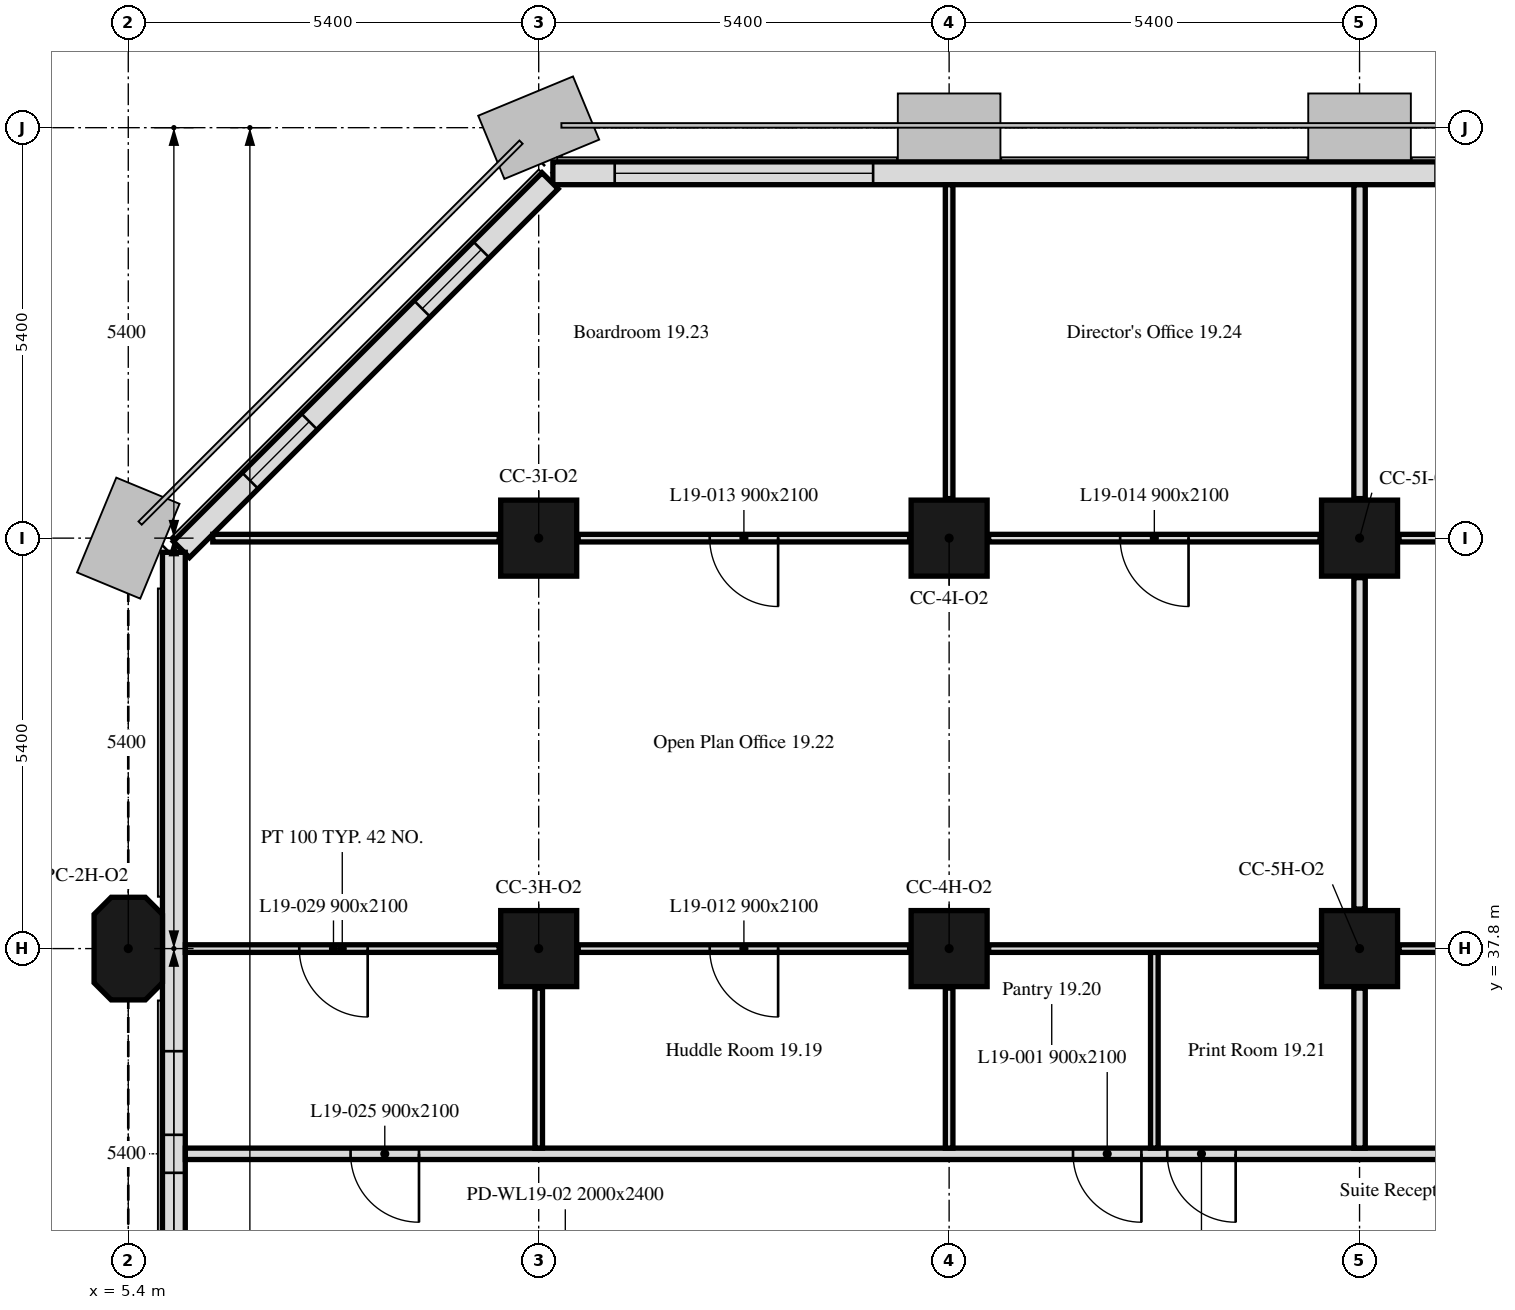
"""IFC4 building model, lengths in metres.
Left out: names, types, materials, properties, quantities, classifications, styles, units other than length and angle.
Written with IfcOpenShell. Run it as: python <this file> out.ifc"""

import sys

from ifc_helpers import new_model, si_unit, direction, frame, frame_2d, origin, origin_2d, place, context, subcontext, project, spatial, polyline, rectangle, outline, extrude, element, fill, save


model = new_model("IFC4")
c1 = context("Model", 3, precision=1e-05, world=origin(), true_north=direction((0.0, 1.0)))
c2 = subcontext(c1, "Body", "Model", "MODEL_VIEW")
j1 = project(units=[si_unit("LENGTHUNIT", "METRE"), si_unit("PLANEANGLEUNIT", "RADIAN")], contexts=[c1])
p1 = place(None, origin())
s1 = spatial("IfcSite", under=j1, at=p1, CompositionType="ELEMENT")
p2 = place(p1, origin())
s2 = spatial("IfcBuilding", under=s1, at=p2, CompositionType="ELEMENT")
p3 = place(p2, frame((0.0, 0.0, 84.0)))
s3 = spatial("IfcBuildingStorey", under=s2, at=p3, CompositionType="ELEMENT", Elevation=84.0)
p4 = place(p3, frame((5.4, 37.8, 0.0), z_axis=(0.0, 0.0, 1.0), x_axis=(0.0, 1.0, 0.0)))
e1 = element("IfcColumn", 1, at=p4, inside=s3, PredefinedType="COLUMN", context=c2, shape_type="SweptSolid", body=[
    extrude(outline(polyline([(-0.45, -0.45), (0.45, -0.45), (0.675, -0.225), (0.675, 0.225), (0.45, 0.45), (-0.45, 0.45), (-0.675, 0.225), (-0.675, -0.225), (-0.45, -0.45)])), origin(), (0.0, 0.0, 1.0), 3.5),
])
for number, where, z_axis, x_axis in (
    (2, (10.8, 37.8, 0.0), (0.0, 0.0, 1.0), (1.0, 0.0, 0.0)),
    (3, (16.2, 37.8, 0.0), (0.0, 0.0, 1.0), (1.0, 0.0, 0.0)),
    (4, (21.6, 37.8, 0.0), (0.0, 0.0, 1.0), (1.0, 0.0, 0.0)),
    (5, (10.8, 43.2, 0.0), (0.0, 0.0, 1.0), (1.0, 0.0, 0.0)),
    (6, (16.2, 43.2, 0.0), (0.0, 0.0, 1.0), (1.0, 0.0, 0.0)),
    (7, (21.6, 43.2, 0.0), (0.0, 0.0, 1.0), (1.0, 0.0, 0.0)),
):
    element("IfcColumn", number, at=place(p3, frame(where, z_axis=z_axis, x_axis=x_axis)), inside=s3, PredefinedType="COLUMN", context=c2, shape_type="SweptSolid", body=[
        extrude(rectangle(XDim=1.0, YDim=1.0, at=origin_2d()), origin(), (0.0, 0.0, 1.0), 3.5),
    ])
p5 = place(p3, frame((43.014, 48.0, 0.0), z_axis=(0.0, 0.0, 1.0), x_axis=(-1.0, 0.0, 0.0)))
e8 = element("IfcWall", 8, at=p5, inside=s3, PredefinedType="SOLIDWALL", context=c2, shape_type="SweptSolid", body=[
    extrude(rectangle(XDim=32.027, YDim=0.3, at=frame_2d((16.014, 0.0))), origin(), (0.0, 0.0, 1.0), 3.5),
])
p6 = place(p5, frame((6.214, 0.0, 0.9)))
e9 = element("IfcOpeningElement", 9, at=p6, cuts=e8, PredefinedType="OPENING", context=c2, shape_type="SweptSolid", body=[
    extrude(rectangle(XDim=3.4, YDim=1.7, at=frame_2d((1.7, 0.85))), frame((0.0, 0.16, 0.0), z_axis=(0.0, -1.0, 0.0), x_axis=(1.0, 0.0, 0.0)), (0.0, 0.0, 1.0), 0.32),
])
p7 = place(p5, frame((17.014, 0.0, 0.9)))
e10 = element("IfcOpeningElement", 10, at=p7, cuts=e8, PredefinedType="OPENING", context=c2, shape_type="SweptSolid", body=[
    extrude(rectangle(XDim=3.4, YDim=1.7, at=frame_2d((1.7, 0.85))), frame((0.0, 0.16, 0.0), z_axis=(0.0, -1.0, 0.0), x_axis=(1.0, 0.0, 0.0)), (0.0, 0.0, 1.0), 0.32),
])
p8 = place(p5, frame((27.814, 0.0, 0.9)))
e11 = element("IfcOpeningElement", 11, at=p8, cuts=e8, PredefinedType="OPENING", context=c2, shape_type="SweptSolid", body=[
    extrude(rectangle(XDim=3.4, YDim=1.7, at=frame_2d((1.7, 0.85))), frame((0.0, 0.16, 0.0), z_axis=(0.0, -1.0, 0.0), x_axis=(1.0, 0.0, 0.0)), (0.0, 0.0, 1.0), 0.32),
])
p9 = place(p3, frame((10.949, 47.901, 0.0), z_axis=(0.0, 0.0, 1.0), x_axis=(-0.707106781187, -0.707106781187, 0.0)))
e12 = element("IfcWall", 12, at=p9, inside=s3, PredefinedType="SOLIDWALL", context=c2, shape_type="SweptSolid", body=[
    extrude(rectangle(XDim=6.86, YDim=0.3, at=frame_2d((3.43, 0.0))), origin(), (0.0, 0.0, 1.0), 3.5),
])
p10 = place(p9, frame((1.28, 0.0, 0.9)))
e13 = element("IfcOpeningElement", 13, at=p10, cuts=e12, PredefinedType="OPENING", context=c2, shape_type="SweptSolid", body=[
    extrude(rectangle(XDim=1.1, YDim=1.7, at=frame_2d((0.55, 0.85))), frame((0.0, 0.16, 0.0), z_axis=(0.0, -1.0, 0.0), x_axis=(1.0, 0.0, 0.0)), (0.0, 0.0, 1.0), 0.32),
])
p11 = place(p9, frame((4.48, 0.0, 0.9)))
e14 = element("IfcOpeningElement", 14, at=p11, cuts=e12, PredefinedType="OPENING", context=c2, shape_type="SweptSolid", body=[
    extrude(rectangle(XDim=1.1, YDim=1.7, at=frame_2d((0.55, 0.85))), frame((0.0, 0.16, 0.0), z_axis=(0.0, -1.0, 0.0), x_axis=(1.0, 0.0, 0.0)), (0.0, 0.0, 1.0), 0.32),
])
p12 = place(p3, frame((6.0, 43.014, 0.0), z_axis=(0.0, 0.0, 1.0), x_axis=(0.0, -1.0, 0.0)))
e15 = element("IfcWall", 15, at=p12, inside=s3, PredefinedType="SOLIDWALL", context=c2, shape_type="SweptSolid", body=[
    extrude(rectangle(XDim=10.614, YDim=0.3, at=frame_2d((5.307, 0.0))), origin(), (0.0, 0.0, 1.0), 3.5),
])
p13 = place(p12, frame((6.564, 0.0, 0.9)))
e16 = element("IfcOpeningElement", 16, at=p13, cuts=e15, PredefinedType="OPENING", context=c2, shape_type="SweptSolid", body=[
    extrude(rectangle(XDim=1.1, YDim=1.7, at=frame_2d((0.55, 0.85))), frame((0.0, 0.16, 0.0), z_axis=(0.0, -1.0, 0.0), x_axis=(1.0, 0.0, 0.0)), (0.0, 0.0, 1.0), 0.32),
])
p14 = place(p12, frame((8.164, 0.0, 0.9)))
e17 = element("IfcOpeningElement", 17, at=p14, cuts=e15, PredefinedType="OPENING", context=c2, shape_type="SweptSolid", body=[
    extrude(rectangle(XDim=1.1, YDim=1.7, at=frame_2d((0.55, 0.85))), frame((0.0, 0.16, 0.0), z_axis=(0.0, -1.0, 0.0), x_axis=(1.0, 0.0, 0.0)), (0.0, 0.0, 1.0), 0.32),
])
p15 = place(p3, frame((47.849, 35.1, 0.0), z_axis=(0.0, 0.0, 1.0), x_axis=(-1.0, 0.0, 0.0)))
e18 = element("IfcWall", 18, at=p15, inside=s3, PredefinedType="PARTITIONING", context=c2, shape_type="SweptSolid", body=[
    extrude(rectangle(XDim=41.698, YDim=0.15, at=frame_2d((20.849, 0.0))), origin(), (0.0, 0.0, 1.0), 2.75),
])
p16 = place(p15, frame((29.119, 0.0, 0.0)))
e19 = element("IfcOpeningElement", 19, at=p16, cuts=e18, PredefinedType="OPENING", context=c2, shape_type="SweptSolid", body=[
    extrude(rectangle(XDim=0.9, YDim=2.1, at=frame_2d((0.45, 1.05))), frame((0.0, 0.075, 0.0), z_axis=(0.0, -1.0, 0.0), x_axis=(1.0, 0.0, 0.0)), (0.0, 0.0, 1.0), 0.15),
])
p17 = place(p15, frame((27.879, 0.0, 0.0)))
e20 = element("IfcOpeningElement", 20, at=p17, cuts=e18, PredefinedType="OPENING", context=c2, shape_type="SweptSolid", body=[
    extrude(rectangle(XDim=0.9, YDim=2.1, at=frame_2d((0.45, 1.05))), frame((0.0, 0.075, 0.0), z_axis=(0.0, -1.0, 0.0), x_axis=(1.0, 0.0, 0.0)), (0.0, 0.0, 1.0), 0.15),
])
p18 = place(p15, frame((18.319, 0.0, 0.0)))
e21 = element("IfcOpeningElement", 21, at=p18, cuts=e18, PredefinedType="OPENING", context=c2, shape_type="SweptSolid", body=[
    extrude(rectangle(XDim=0.9, YDim=2.1, at=frame_2d((0.45, 1.05))), frame((0.0, 0.075, 0.0), z_axis=(0.0, -1.0, 0.0), x_axis=(1.0, 0.0, 0.0)), (0.0, 0.0, 1.0), 0.15),
])
p19 = place(p15, frame((11.679, 0.0, 0.0)))
e22 = element("IfcOpeningElement", 22, at=p19, cuts=e18, PredefinedType="OPENING", context=c2, shape_type="SweptSolid", body=[
    extrude(rectangle(XDim=0.9, YDim=2.1, at=frame_2d((0.45, 1.05))), frame((0.0, 0.075, 0.0), z_axis=(0.0, -1.0, 0.0), x_axis=(1.0, 0.0, 0.0)), (0.0, 0.0, 1.0), 0.15),
])
p20 = place(p15, frame((38.624, 0.0, 0.0)))
e23 = element("IfcOpeningElement", 23, at=p20, cuts=e18, PredefinedType="OPENING", context=c2, shape_type="SweptSolid", body=[
    extrude(rectangle(XDim=0.9, YDim=2.1, at=frame_2d((0.45, 1.05))), frame((0.0, 0.075, 0.0), z_axis=(0.0, -1.0, 0.0), x_axis=(1.0, 0.0, 0.0)), (0.0, 0.0, 1.0), 0.15),
])
p21 = place(p15, frame((23.099, 0.0, 0.0)))
e24 = element("IfcOpeningElement", 24, at=p21, cuts=e18, PredefinedType="OPENING", context=c2, shape_type="SweptSolid", body=[
    extrude(rectangle(XDim=0.9, YDim=2.1, at=frame_2d((0.45, 1.05))), frame((0.0, 0.075, 0.0), z_axis=(0.0, -1.0, 0.0), x_axis=(1.0, 0.0, 0.0)), (0.0, 0.0, 1.0), 0.15),
])
p22 = place(p15, frame((6.899, 0.0, 0.0)))
e25 = element("IfcOpeningElement", 25, at=p22, cuts=e18, PredefinedType="OPENING", context=c2, shape_type="SweptSolid", body=[
    extrude(rectangle(XDim=0.9, YDim=2.1, at=frame_2d((0.45, 1.05))), frame((0.0, 0.075, 0.0), z_axis=(0.0, -1.0, 0.0), x_axis=(1.0, 0.0, 0.0)), (0.0, 0.0, 1.0), 0.15),
])
p23 = place(p3, frame((10.28, 37.8, 0.0), z_axis=(0.0, 0.0, 1.0), x_axis=(-1.0, 0.0, 0.0)))
e26 = element("IfcWall", 26, at=p23, inside=s3, PredefinedType="PARTITIONING", context=c2, shape_type="SweptSolid", body=[
    extrude(rectangle(XDim=4.129, YDim=0.1, at=frame_2d((2.064, 0.0))), origin(), (0.0, 0.0, 1.0), 3.5),
])
p24 = place(p23, frame((1.73, 0.0, 0.0)))
e27 = element("IfcOpeningElement", 27, at=p24, cuts=e26, PredefinedType="OPENING", context=c2, shape_type="SweptSolid", body=[
    extrude(rectangle(XDim=0.9, YDim=2.1, at=frame_2d((0.45, 1.05))), frame((0.0, 0.05, 0.0), z_axis=(0.0, -1.0, 0.0), x_axis=(1.0, 0.0, 0.0)), (0.0, 0.0, 1.0), 0.1),
])
p25 = place(p3, frame((10.8, 35.175, 0.0), z_axis=(0.0, 0.0, 1.0), x_axis=(0.0, 1.0, 0.0)))
e28 = element("IfcWall", 28, at=p25, inside=s3, PredefinedType="PARTITIONING", context=c2, shape_type="SweptSolid", body=[
    extrude(rectangle(XDim=2.105, YDim=0.1, at=frame_2d((1.052, 0.0))), origin(), (0.0, 0.0, 1.0), 3.5),
])
p26 = place(p3, frame((16.2, 35.175, 0.0), z_axis=(0.0, 0.0, 1.0), x_axis=(0.0, 1.0, 0.0)))
e29 = element("IfcWall", 29, at=p26, inside=s3, PredefinedType="PARTITIONING", context=c2, shape_type="SweptSolid", body=[
    extrude(rectangle(XDim=2.105, YDim=0.1, at=frame_2d((1.052, 0.0))), origin(), (0.0, 0.0, 1.0), 2.75),
])
p27 = place(p3, frame((15.68, 37.8, 0.0), z_axis=(0.0, 0.0, 1.0), x_axis=(-1.0, 0.0, 0.0)))
e30 = element("IfcWall", 30, at=p27, inside=s3, PredefinedType="PARTITIONING", context=c2, shape_type="SweptSolid", body=[
    extrude(rectangle(XDim=4.36, YDim=0.1, at=frame_2d((2.18, 0.0))), origin(), (0.0, 0.0, 1.0), 3.5),
])
p28 = place(p27, frame((1.73, 0.0, 0.0)))
e31 = element("IfcOpeningElement", 31, at=p28, cuts=e30, PredefinedType="OPENING", context=c2, shape_type="SweptSolid", body=[
    extrude(rectangle(XDim=0.9, YDim=2.1, at=frame_2d((0.45, 1.05))), frame((0.0, 0.05, 0.0), z_axis=(0.0, -1.0, 0.0), x_axis=(1.0, 0.0, 0.0)), (0.0, 0.0, 1.0), 0.1),
])
p29 = place(p3, frame((18.9, 35.175, 0.0), z_axis=(0.0, 0.0, 1.0), x_axis=(0.0, 1.0, 0.0)))
e32 = element("IfcWall", 32, at=p29, inside=s3, PredefinedType="PARTITIONING", context=c2, shape_type="SweptSolid", body=[
    extrude(rectangle(XDim=2.575, YDim=0.1, at=frame_2d((1.288, 0.0))), origin(), (0.0, 0.0, 1.0), 3.5),
])
p30 = place(p3, frame((21.6, 35.175, 0.0), z_axis=(0.0, 0.0, 1.0), x_axis=(0.0, 1.0, 0.0)))
e33 = element("IfcWall", 33, at=p30, inside=s3, PredefinedType="PARTITIONING", context=c2, shape_type="SweptSolid", body=[
    extrude(rectangle(XDim=2.105, YDim=0.15, at=frame_2d((1.052, 0.0))), origin(), (0.0, 0.0, 1.0), 2.75),
])
p31 = place(p3, frame((21.08, 37.8, 0.0), z_axis=(0.0, 0.0, 1.0), x_axis=(-1.0, 0.0, 0.0)))
e34 = element("IfcWall", 34, at=p31, inside=s3, PredefinedType="PARTITIONING", context=c2, shape_type="SweptSolid", body=[
    extrude(rectangle(XDim=4.36, YDim=0.1, at=frame_2d((2.18, 0.0))), origin(), (0.0, 0.0, 1.0), 3.5),
])
p32 = place(p3, frame((21.08, 43.2, 0.0), z_axis=(0.0, 0.0, 1.0), x_axis=(-1.0, 0.0, 0.0)))
e35 = element("IfcWall", 35, at=p32, inside=s3, PredefinedType="PARTITIONING", context=c2, shape_type="SweptSolid", body=[
    extrude(rectangle(XDim=4.36, YDim=0.1, at=frame_2d((2.18, 0.0))), origin(), (0.0, 0.0, 1.0), 3.5),
])
p33 = place(p32, frame((1.73, 0.0, 0.0)))
e36 = element("IfcOpeningElement", 36, at=p33, cuts=e35, PredefinedType="OPENING", context=c2, shape_type="SweptSolid", body=[
    extrude(rectangle(XDim=0.9, YDim=2.1, at=frame_2d((0.45, 1.05))), frame((0.0, 0.05, 0.0), z_axis=(0.0, -1.0, 0.0), x_axis=(1.0, 0.0, 0.0)), (0.0, 0.0, 1.0), 0.1),
])
p34 = place(p3, frame((15.68, 43.2, 0.0), z_axis=(0.0, 0.0, 1.0), x_axis=(-1.0, 0.0, 0.0)))
e37 = element("IfcWall", 37, at=p34, inside=s3, PredefinedType="PARTITIONING", context=c2, shape_type="SweptSolid", body=[
    extrude(rectangle(XDim=4.36, YDim=0.1, at=frame_2d((2.18, 0.0))), origin(), (0.0, 0.0, 1.0), 3.5),
])
p35 = place(p34, frame((1.73, 0.0, 0.0)))
e38 = element("IfcOpeningElement", 38, at=p35, cuts=e37, PredefinedType="OPENING", context=c2, shape_type="SweptSolid", body=[
    extrude(rectangle(XDim=0.9, YDim=2.1, at=frame_2d((0.45, 1.05))), frame((0.0, 0.05, 0.0), z_axis=(0.0, -1.0, 0.0), x_axis=(1.0, 0.0, 0.0)), (0.0, 0.0, 1.0), 0.1),
])
p36 = place(p3, frame((10.28, 43.2, 0.0), z_axis=(0.0, 0.0, 1.0), x_axis=(-1.0, 0.0, 0.0)))
e39 = element("IfcWall", 39, at=p36, inside=s3, PredefinedType="PARTITIONING", context=c2, shape_type="SweptSolid", body=[
    extrude(rectangle(XDim=3.768, YDim=0.1, at=frame_2d((1.884, 0.0))), origin(), (0.0, 0.0, 1.0), 3.5),
])
p37 = place(p3, frame((21.6, 38.32, 0.0), z_axis=(0.0, 0.0, 1.0), x_axis=(0.0, 1.0, 0.0)))
e40 = element("IfcWall", 40, at=p37, inside=s3, PredefinedType="PARTITIONING", context=c2, shape_type="SweptSolid", body=[
    extrude(rectangle(XDim=4.36, YDim=0.15, at=frame_2d((2.18, 0.0))), origin(), (0.0, 0.0, 1.0), 2.75),
])
p38 = place(p3, frame((16.2, 43.72, 0.0), z_axis=(0.0, 0.0, 1.0), x_axis=(0.0, 1.0, 0.0)))
e41 = element("IfcWall", 41, at=p38, inside=s3, PredefinedType="PARTITIONING", context=c2, shape_type="SweptSolid", body=[
    extrude(rectangle(XDim=4.129, YDim=0.1, at=frame_2d((2.064, 0.0))), origin(), (0.0, 0.0, 1.0), 2.75),
])
p39 = place(p3, frame((21.6, 43.72, 0.0), z_axis=(0.0, 0.0, 1.0), x_axis=(0.0, 1.0, 0.0)))
e42 = element("IfcWall", 42, at=p39, inside=s3, PredefinedType="PARTITIONING", context=c2, shape_type="SweptSolid", body=[
    extrude(rectangle(XDim=4.129, YDim=0.15, at=frame_2d((2.064, 0.0))), origin(), (0.0, 0.0, 1.0), 2.75),
])
p40 = place(p3, frame((26.48, 37.8, 0.0), z_axis=(0.0, 0.0, 1.0), x_axis=(-1.0, 0.0, 0.0)))
e43 = element("IfcWall", 43, at=p40, inside=s3, PredefinedType="PARTITIONING", context=c2, shape_type="SweptSolid", body=[
    extrude(rectangle(XDim=4.36, YDim=0.1, at=frame_2d((2.18, 0.0))), origin(), (0.0, 0.0, 1.0), 3.5),
])
p41 = place(p40, frame((1.73, 0.0, 0.0)))
e44 = element("IfcOpeningElement", 44, at=p41, cuts=e43, PredefinedType="OPENING", context=c2, shape_type="SweptSolid", body=[
    extrude(rectangle(XDim=0.9, YDim=2.1, at=frame_2d((0.45, 1.05))), frame((0.0, 0.05, 0.0), z_axis=(0.0, -1.0, 0.0), x_axis=(1.0, 0.0, 0.0)), (0.0, 0.0, 1.0), 0.1),
])
p42 = place(p3, frame((26.48, 43.2, 0.0), z_axis=(0.0, 0.0, 1.0), x_axis=(-1.0, 0.0, 0.0)))
e45 = element("IfcWall", 45, at=p42, inside=s3, PredefinedType="PARTITIONING", context=c2, shape_type="SweptSolid", body=[
    extrude(rectangle(XDim=4.36, YDim=0.1, at=frame_2d((2.18, 0.0))), origin(), (0.0, 0.0, 1.0), 3.5),
])
p43 = place(p42, frame((1.73, 0.0, 0.0)))
e46 = element("IfcOpeningElement", 46, at=p43, cuts=e45, PredefinedType="OPENING", context=c2, shape_type="SweptSolid", body=[
    extrude(rectangle(XDim=0.9, YDim=2.1, at=frame_2d((0.45, 1.05))), frame((0.0, 0.05, 0.0), z_axis=(0.0, -1.0, 0.0), x_axis=(1.0, 0.0, 0.0)), (0.0, 0.0, 1.0), 0.1),
])
p44 = place(p8, origin())
e47 = element("IfcWindow", 47, at=p44, inside=s3, PartitioningType="SINGLE_PANEL", PredefinedType="WINDOW", context=c2, shape_type="SweptSolid", body=[
    extrude(rectangle(XDim=3.4, YDim=1.7, at=frame_2d((1.7, 0.85))), frame((0.0, 0.03, 0.0), z_axis=(0.0, -1.0, 0.0), x_axis=(1.0, 0.0, 0.0)), (0.0, 0.0, 1.0), 0.06),
])
fill(e11, e47)
p45 = place(p10, origin())
e48 = element("IfcWindow", 48, at=p45, inside=s3, PartitioningType="SINGLE_PANEL", PredefinedType="WINDOW", context=c2, shape_type="SweptSolid", body=[
    extrude(rectangle(XDim=1.1, YDim=1.7, at=frame_2d((0.55, 0.85))), frame((0.0, 0.03, 0.0), z_axis=(0.0, -1.0, 0.0), x_axis=(1.0, 0.0, 0.0)), (0.0, 0.0, 1.0), 0.06),
])
fill(e13, e48)
p46 = place(p11, origin())
e49 = element("IfcWindow", 49, at=p46, inside=s3, PartitioningType="SINGLE_PANEL", PredefinedType="WINDOW", context=c2, shape_type="SweptSolid", body=[
    extrude(rectangle(XDim=1.1, YDim=1.7, at=frame_2d((0.55, 0.85))), frame((0.0, 0.03, 0.0), z_axis=(0.0, -1.0, 0.0), x_axis=(1.0, 0.0, 0.0)), (0.0, 0.0, 1.0), 0.06),
])
fill(e14, e49)
p47 = place(p13, origin())
e50 = element("IfcWindow", 50, at=p47, inside=s3, PartitioningType="SINGLE_PANEL", PredefinedType="WINDOW", context=c2, shape_type="SweptSolid", body=[
    extrude(rectangle(XDim=1.1, YDim=1.7, at=frame_2d((0.55, 0.85))), frame((0.0, 0.03, 0.0), z_axis=(0.0, -1.0, 0.0), x_axis=(1.0, 0.0, 0.0)), (0.0, 0.0, 1.0), 0.06),
])
fill(e16, e50)
p48 = place(p14, origin())
e51 = element("IfcWindow", 51, at=p48, inside=s3, PartitioningType="SINGLE_PANEL", PredefinedType="WINDOW", context=c2, shape_type="SweptSolid", body=[
    extrude(rectangle(XDim=1.1, YDim=1.7, at=frame_2d((0.55, 0.85))), frame((0.0, 0.03, 0.0), z_axis=(0.0, -1.0, 0.0), x_axis=(1.0, 0.0, 0.0)), (0.0, 0.0, 1.0), 0.06),
])
fill(e17, e51)
p49 = place(p16, origin())
e52 = element("IfcDoor", 52, at=p49, inside=s3, OperationType="SINGLE_SWING_RIGHT", PredefinedType="DOOR", context=c2, shape_type="SweptSolid", body=[
    extrude(rectangle(XDim=0.9, YDim=2.1, at=frame_2d((0.45, 1.05))), frame((0.0, 0.025, 0.0), z_axis=(0.0, -1.0, 0.0), x_axis=(1.0, 0.0, 0.0)), (0.0, 0.0, 1.0), 0.05),
])
fill(e19, e52)
p50 = place(p17, origin())
e53 = element("IfcDoor", 53, at=p50, inside=s3, OperationType="SINGLE_SWING_RIGHT", PredefinedType="DOOR", context=c2, shape_type="SweptSolid", body=[
    extrude(rectangle(XDim=0.9, YDim=2.1, at=frame_2d((0.45, 1.05))), frame((0.0, 0.025, 0.0), z_axis=(0.0, -1.0, 0.0), x_axis=(1.0, 0.0, 0.0)), (0.0, 0.0, 1.0), 0.05),
])
fill(e20, e53)
p51 = place(p28, origin())
e54 = element("IfcDoor", 54, at=p51, inside=s3, OperationType="SINGLE_SWING_LEFT", PredefinedType="DOOR", context=c2, shape_type="SweptSolid", body=[
    extrude(rectangle(XDim=0.9, YDim=2.1, at=frame_2d((0.45, 1.05))), frame((0.0, 0.025, 0.0), z_axis=(0.0, -1.0, 0.0), x_axis=(1.0, 0.0, 0.0)), (0.0, 0.0, 1.0), 0.05),
])
fill(e31, e54)
p52 = place(p35, origin())
e55 = element("IfcDoor", 55, at=p52, inside=s3, OperationType="SINGLE_SWING_LEFT", PredefinedType="DOOR", context=c2, shape_type="SweptSolid", body=[
    extrude(rectangle(XDim=0.9, YDim=2.1, at=frame_2d((0.45, 1.05))), frame((0.0, 0.025, 0.0), z_axis=(0.0, -1.0, 0.0), x_axis=(1.0, 0.0, 0.0)), (0.0, 0.0, 1.0), 0.05),
])
fill(e38, e55)
p53 = place(p33, origin())
e56 = element("IfcDoor", 56, at=p53, inside=s3, OperationType="SINGLE_SWING_LEFT", PredefinedType="DOOR", context=c2, shape_type="SweptSolid", body=[
    extrude(rectangle(XDim=0.9, YDim=2.1, at=frame_2d((0.45, 1.05))), frame((0.0, 0.025, 0.0), z_axis=(0.0, -1.0, 0.0), x_axis=(1.0, 0.0, 0.0)), (0.0, 0.0, 1.0), 0.05),
])
fill(e36, e56)
p54 = place(p20, origin())
e57 = element("IfcDoor", 57, at=p54, inside=s3, OperationType="SINGLE_SWING_RIGHT", PredefinedType="DOOR", context=c2, shape_type="SweptSolid", body=[
    extrude(rectangle(XDim=0.9, YDim=2.1, at=frame_2d((0.45, 1.05))), frame((0.0, 0.025, 0.0), z_axis=(0.0, -1.0, 0.0), x_axis=(1.0, 0.0, 0.0)), (0.0, 0.0, 1.0), 0.05),
])
fill(e23, e57)
p55 = place(p24, origin())
e58 = element("IfcDoor", 58, at=p55, inside=s3, OperationType="SINGLE_SWING_RIGHT", PredefinedType="DOOR", context=c2, shape_type="SweptSolid", body=[
    extrude(rectangle(XDim=0.9, YDim=2.1, at=frame_2d((0.45, 1.05))), frame((0.0, 0.025, 0.0), z_axis=(0.0, -1.0, 0.0), x_axis=(1.0, 0.0, 0.0)), (0.0, 0.0, 1.0), 0.05),
])
fill(e27, e58)
save(model, sys.argv[1])
